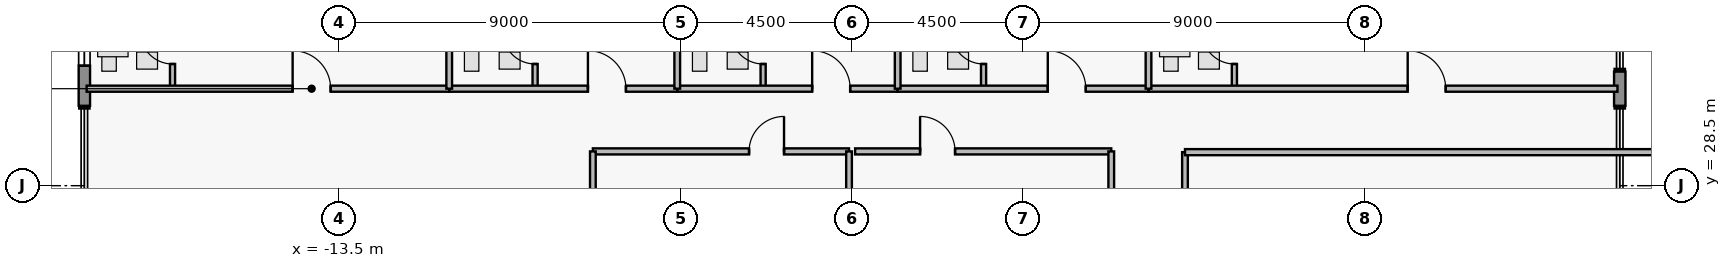
"""IFC4 building model, lengths in metres.
Left out: names, types, materials, properties, quantities, classifications, styles, units other than length and angle.
Written with IfcOpenShell. Run it as: python <this file> out.ifc"""

import sys

from ifc_helpers import new_model, si_unit, direction, frame, frame_2d, origin, place, context, subcontext, project, spatial, rectangle, extrude, element, fill, save


model = new_model("IFC4")
c1 = context("Model", 3, precision=1e-05, world=origin(), true_north=direction((0.0, 1.0)))
c2 = subcontext(c1, "Body", "Model", "MODEL_VIEW")
j1 = project(units=[si_unit("LENGTHUNIT", "METRE"), si_unit("PLANEANGLEUNIT", "RADIAN")], contexts=[c1])
p1 = place(None, origin())
s1 = spatial("IfcSite", under=j1, at=p1, CompositionType="ELEMENT")
p2 = place(p1, origin())
s2 = spatial("IfcBuilding", under=s1, at=p2, CompositionType="ELEMENT")
p3 = place(p2, frame((0.0, 0.0, 243.35)))
s3 = spatial("IfcBuildingStorey", under=s2, at=p3, CompositionType="ELEMENT", Elevation=243.35)
p4 = place(p3, frame((-20.2, 30.6, 0.0), z_axis=(0.0, 0.0, 1.0), x_axis=(0.0, 1.0, 0.0)))
e1 = element("IfcWall", 1, at=p4, inside=s3, PredefinedType="STANDARD", context=c2, shape_type="SweptSolid", body=[
    extrude(rectangle(XDim=5.0, YDim=0.3, at=frame_2d((2.5, 0.0))), origin(), (0.0, 0.0, 1.0), 3.48),
])
p5 = place(p4, frame((1.055, 0.0, 0.95)))
e2 = element("IfcOpeningElement", 2, at=p5, cuts=e1, PredefinedType="OPENING", context=c2, shape_type="SweptSolid", body=[
    extrude(rectangle(XDim=1.15, YDim=1.55, at=frame_2d((0.575, 0.775))), frame((0.0, 0.16, 0.0), z_axis=(0.0, -1.0, 0.0), x_axis=(1.0, 0.0, 0.0)), (0.0, 0.0, 1.0), 0.32),
])
p6 = place(p4, frame((3.27, 0.0, 0.95)))
e3 = element("IfcOpeningElement", 3, at=p6, cuts=e1, PredefinedType="OPENING", context=c2, shape_type="SweptSolid", body=[
    extrude(rectangle(XDim=1.15, YDim=1.55, at=frame_2d((0.575, 0.775))), frame((0.0, 0.16, 0.0), z_axis=(0.0, -1.0, 0.0), x_axis=(1.0, 0.0, 0.0)), (0.0, 0.0, 1.0), 0.32),
])
p7 = place(p3, frame((20.2, 31.5, 0.0), z_axis=(0.0, 0.0, 1.0), x_axis=(0.0, -1.0, 0.0)))
e4 = element("IfcWall", 4, at=p7, inside=s3, PredefinedType="STANDARD", context=c2, shape_type="SweptSolid", body=[
    extrude(rectangle(XDim=0.9, YDim=0.3, at=frame_2d((0.45, 0.0))), origin(), (0.0, 0.0, 1.0), 3.48),
])
p8 = place(p3, frame((-17.88, 31.05, 0.0), z_axis=(0.0, 0.0, 1.0), x_axis=(0.0, 1.0, 0.0)))
e5 = element("IfcWall", 5, at=p8, inside=s3, PredefinedType="PLUMBINGWALL", context=c2, shape_type="SweptSolid", body=[
    extrude(rectangle(XDim=2.36, YDim=0.135, at=frame_2d((1.18, 0.0))), origin(), (0.0, 0.0, 1.0), 3.48),
])
p9 = place(p8, frame((0.65, 0.0, 0.0)))
e6 = element("IfcOpeningElement", 6, at=p9, cuts=e5, PredefinedType="OPENING", context=c2, shape_type="SweptSolid", body=[
    extrude(rectangle(XDim=0.85, YDim=2.1, at=frame_2d((0.425, 1.05))), frame((0.0, 0.077, 0.0), z_axis=(0.0, -1.0, 0.0), x_axis=(1.0, 0.0, 0.0)), (0.0, 0.0, 1.0), 0.155),
])
p10 = place(p3, frame((-20.14, 31.05, 0.0), z_axis=(0.0, 0.0, 1.0), x_axis=(1.0, 0.0, 0.0)))
e7 = element("IfcWall", 7, at=p10, inside=s3, PredefinedType="PARTITIONING", context=c2, shape_type="SweptSolid", body=[
    extrude(rectangle(XDim=9.54, YDim=0.16, at=frame_2d((4.77, 0.0))), origin(), (0.0, 0.0, 1.0), 3.48),
])
p11 = place(p10, frame((5.42, 0.0, 0.0)))
e8 = element("IfcOpeningElement", 8, at=p11, cuts=e7, PredefinedType="OPENING", context=c2, shape_type="SweptSolid", body=[
    extrude(rectangle(XDim=1.0, YDim=2.15, at=frame_2d((0.5, 1.075))), frame((0.0, 0.09, 0.0), z_axis=(0.0, -1.0, 0.0), x_axis=(1.0, 0.0, 0.0)), (0.0, 0.0, 1.0), 0.18),
])
p12 = place(p3, frame((-8.34, 31.05, 0.0), z_axis=(0.0, 0.0, 1.0), x_axis=(0.0, 1.0, 0.0)))
e9 = element("IfcWall", 9, at=p12, inside=s3, PredefinedType="PLUMBINGWALL", context=c2, shape_type="SweptSolid", body=[
    extrude(rectangle(XDim=2.36, YDim=0.135, at=frame_2d((1.18, 0.0))), origin(), (0.0, 0.0, 1.0), 3.48),
])
p13 = place(p12, frame((0.65, 0.0, 0.0)))
e10 = element("IfcOpeningElement", 10, at=p13, cuts=e9, PredefinedType="OPENING", context=c2, shape_type="SweptSolid", body=[
    extrude(rectangle(XDim=0.85, YDim=2.1, at=frame_2d((0.425, 1.05))), frame((0.0, 0.077, 0.0), z_axis=(0.0, -1.0, 0.0), x_axis=(1.0, 0.0, 0.0)), (0.0, 0.0, 1.0), 0.155),
])
p14 = place(p3, frame((-10.6, 31.05, 0.0), z_axis=(0.0, 0.0, 1.0), x_axis=(1.0, 0.0, 0.0)))
e11 = element("IfcWall", 11, at=p14, inside=s3, PredefinedType="PARTITIONING", context=c2, shape_type="SweptSolid", body=[
    extrude(rectangle(XDim=6.0, YDim=0.16, at=frame_2d((3.0, 0.0))), origin(), (0.0, 0.0, 1.0), 3.48),
])
p15 = place(p14, frame((3.65, 0.0, 0.0)))
e12 = element("IfcOpeningElement", 12, at=p15, cuts=e11, PredefinedType="OPENING", context=c2, shape_type="SweptSolid", body=[
    extrude(rectangle(XDim=1.0, YDim=2.15, at=frame_2d((0.5, 1.075))), frame((0.0, 0.09, 0.0), z_axis=(0.0, -1.0, 0.0), x_axis=(1.0, 0.0, 0.0)), (0.0, 0.0, 1.0), 0.18),
])
p16 = place(p3, frame((-2.34, 31.05, 0.0), z_axis=(0.0, 0.0, 1.0), x_axis=(0.0, 1.0, 0.0)))
e13 = element("IfcWall", 13, at=p16, inside=s3, PredefinedType="PLUMBINGWALL", context=c2, shape_type="SweptSolid", body=[
    extrude(rectangle(XDim=2.36, YDim=0.135, at=frame_2d((1.18, 0.0))), origin(), (0.0, 0.0, 1.0), 3.48),
])
p17 = place(p16, frame((0.65, 0.0, 0.0)))
e14 = element("IfcOpeningElement", 14, at=p17, cuts=e13, PredefinedType="OPENING", context=c2, shape_type="SweptSolid", body=[
    extrude(rectangle(XDim=0.85, YDim=2.1, at=frame_2d((0.425, 1.05))), frame((0.0, 0.077, 0.0), z_axis=(0.0, -1.0, 0.0), x_axis=(1.0, 0.0, 0.0)), (0.0, 0.0, 1.0), 0.155),
])
p18 = place(p3, frame((-4.6, 31.05, 0.0), z_axis=(0.0, 0.0, 1.0), x_axis=(1.0, 0.0, 0.0)))
e15 = element("IfcWall", 15, at=p18, inside=s3, PredefinedType="PARTITIONING", context=c2, shape_type="SweptSolid", body=[
    extrude(rectangle(XDim=5.8, YDim=0.16, at=frame_2d((2.9, 0.0))), origin(), (0.0, 0.0, 1.0), 3.48),
])
p19 = place(p18, frame((3.55, 0.0, 0.0)))
e16 = element("IfcOpeningElement", 16, at=p19, cuts=e15, PredefinedType="OPENING", context=c2, shape_type="SweptSolid", body=[
    extrude(rectangle(XDim=1.0, YDim=2.15, at=frame_2d((0.5, 1.075))), frame((0.0, 0.09, 0.0), z_axis=(0.0, -1.0, 0.0), x_axis=(1.0, 0.0, 0.0)), (0.0, 0.0, 1.0), 0.18),
])
p20 = place(p3, frame((3.46, 31.05, 0.0), z_axis=(0.0, 0.0, 1.0), x_axis=(0.0, 1.0, 0.0)))
e17 = element("IfcWall", 17, at=p20, inside=s3, PredefinedType="PLUMBINGWALL", context=c2, shape_type="SweptSolid", body=[
    extrude(rectangle(XDim=2.36, YDim=0.135, at=frame_2d((1.18, 0.0))), origin(), (0.0, 0.0, 1.0), 3.48),
])
p21 = place(p20, frame((0.65, 0.0, 0.0)))
e18 = element("IfcOpeningElement", 18, at=p21, cuts=e17, PredefinedType="OPENING", context=c2, shape_type="SweptSolid", body=[
    extrude(rectangle(XDim=0.85, YDim=2.1, at=frame_2d((0.425, 1.05))), frame((0.0, 0.077, 0.0), z_axis=(0.0, -1.0, 0.0), x_axis=(1.0, 0.0, 0.0)), (0.0, 0.0, 1.0), 0.155),
])
p22 = place(p3, frame((1.2, 31.05, 0.0), z_axis=(0.0, 0.0, 1.0), x_axis=(1.0, 0.0, 0.0)))
e19 = element("IfcWall", 19, at=p22, inside=s3, PredefinedType="PARTITIONING", context=c2, shape_type="SweptSolid", body=[
    extrude(rectangle(XDim=6.6, YDim=0.16, at=frame_2d((3.3, 0.0))), origin(), (0.0, 0.0, 1.0), 3.48),
])
p23 = place(p22, frame((3.95, 0.0, 0.0)))
e20 = element("IfcOpeningElement", 20, at=p23, cuts=e19, PredefinedType="OPENING", context=c2, shape_type="SweptSolid", body=[
    extrude(rectangle(XDim=1.0, YDim=2.15, at=frame_2d((0.5, 1.075))), frame((0.0, 0.09, 0.0), z_axis=(0.0, -1.0, 0.0), x_axis=(1.0, 0.0, 0.0)), (0.0, 0.0, 1.0), 0.18),
])
p24 = place(p3, frame((10.06, 31.05, 0.0), z_axis=(0.0, 0.0, 1.0), x_axis=(0.0, 1.0, 0.0)))
e21 = element("IfcWall", 21, at=p24, inside=s3, PredefinedType="PLUMBINGWALL", context=c2, shape_type="SweptSolid", body=[
    extrude(rectangle(XDim=2.36, YDim=0.135, at=frame_2d((1.18, 0.0))), origin(), (0.0, 0.0, 1.0), 3.48),
])
p25 = place(p24, frame((0.65, 0.0, 0.0)))
e22 = element("IfcOpeningElement", 22, at=p25, cuts=e21, PredefinedType="OPENING", context=c2, shape_type="SweptSolid", body=[
    extrude(rectangle(XDim=0.85, YDim=2.1, at=frame_2d((0.425, 1.05))), frame((0.0, 0.077, 0.0), z_axis=(0.0, -1.0, 0.0), x_axis=(1.0, 0.0, 0.0)), (0.0, 0.0, 1.0), 0.155),
])
p26 = place(p3, frame((7.8, 31.05, 0.0), z_axis=(0.0, 0.0, 1.0), x_axis=(1.0, 0.0, 0.0)))
e23 = element("IfcWall", 23, at=p26, inside=s3, PredefinedType="PARTITIONING", context=c2, shape_type="SweptSolid", body=[
    extrude(rectangle(XDim=12.34, YDim=0.16, at=frame_2d((6.17, 0.0))), origin(), (0.0, 0.0, 1.0), 3.48),
])
p27 = place(p26, frame((6.82, 0.0, 0.0)))
e24 = element("IfcOpeningElement", 24, at=p27, cuts=e23, PredefinedType="OPENING", context=c2, shape_type="SweptSolid", body=[
    extrude(rectangle(XDim=1.0, YDim=2.15, at=frame_2d((0.5, 1.075))), frame((0.0, 0.09, 0.0), z_axis=(0.0, -1.0, 0.0), x_axis=(1.0, 0.0, 0.0)), (0.0, 0.0, 1.0), 0.18),
])
p28 = place(p3, frame((-6.82, 29.4, 0.0), z_axis=(0.0, 0.0, 1.0), x_axis=(1.0, 0.0, 0.0)))
e25 = element("IfcWall", 25, at=p28, inside=s3, PredefinedType="PARTITIONING", context=c2, shape_type="SweptSolid", body=[
    extrude(rectangle(XDim=6.74, YDim=0.16, at=frame_2d((3.37, 0.0))), origin(), (0.0, 0.0, 1.0), 3.48),
])
p29 = place(p28, frame((4.11, 0.0, 0.0)))
e26 = element("IfcOpeningElement", 26, at=p29, cuts=e25, PredefinedType="OPENING", context=c2, shape_type="SweptSolid", body=[
    extrude(rectangle(XDim=0.92, YDim=2.12, at=frame_2d((0.46, 1.06))), frame((0.0, 0.09, 0.0), z_axis=(0.0, -1.0, 0.0), x_axis=(1.0, 0.0, 0.0)), (0.0, 0.0, 1.0), 0.18),
])
p30 = place(p3, frame((0.08, 29.4, 0.0), z_axis=(0.0, 0.0, 1.0), x_axis=(1.0, 0.0, 0.0)))
e27 = element("IfcWall", 27, at=p30, inside=s3, PredefinedType="PARTITIONING", context=c2, shape_type="SweptSolid", body=[
    extrude(rectangle(XDim=6.74, YDim=0.16, at=frame_2d((3.37, 0.0))), origin(), (0.0, 0.0, 1.0), 3.48),
])
p31 = place(p30, frame((1.71, 0.0, 0.0)))
e28 = element("IfcOpeningElement", 28, at=p31, cuts=e27, PredefinedType="OPENING", context=c2, shape_type="SweptSolid", body=[
    extrude(rectangle(XDim=0.92, YDim=2.12, at=frame_2d((0.46, 1.06))), frame((0.0, 0.09, 0.0), z_axis=(0.0, -1.0, 0.0), x_axis=(1.0, 0.0, 0.0)), (0.0, 0.0, 1.0), 0.18),
])
p32 = place(p3, frame((-10.6, 31.05, 0.0), z_axis=(0.0, 0.0, 1.0), x_axis=(0.0, 1.0, 0.0)))
e29 = element("IfcWall", 29, at=p32, inside=s3, PredefinedType="PARTITIONING", context=c2, shape_type="SweptSolid", body=[
    extrude(rectangle(XDim=7.87, YDim=0.15, at=frame_2d((3.935, 0.0))), origin(), (0.0, 0.0, 1.0), 3.48),
])
p33 = place(p3, frame((-4.6, 31.05, 0.0), z_axis=(0.0, 0.0, 1.0), x_axis=(0.0, 1.0, 0.0)))
e30 = element("IfcWall", 30, at=p33, inside=s3, PredefinedType="PARTITIONING", context=c2, shape_type="SweptSolid", body=[
    extrude(rectangle(XDim=7.87, YDim=0.15, at=frame_2d((3.935, 0.0))), origin(), (0.0, 0.0, 1.0), 2.362),
])
for number, where, z_axis, x_axis in (
    (31, (1.2, 31.05, 0.0), (0.0, 0.0, 1.0), (0.0, 1.0, 0.0)),
    (32, (7.8, 31.05, 0.0), (0.0, 0.0, 1.0), (0.0, 1.0, 0.0)),
):
    element("IfcWall", number, at=place(p3, frame(where, z_axis=z_axis, x_axis=x_axis)), inside=s3, PredefinedType="PARTITIONING", context=c2, shape_type="SweptSolid", body=[
        extrude(rectangle(XDim=7.87, YDim=0.15, at=frame_2d((3.935, 0.0))), origin(), (0.0, 0.0, 1.0), 3.48),
    ])
for number, where, z_axis, x_axis in (
    (33, (-6.82, 27.0, 0.0), (0.0, 0.0, 1.0), (0.0, 1.0, 0.0)),
    (34, (-0.08, 27.0, 0.0), (0.0, 0.0, 1.0), (0.0, 1.0, 0.0)),
    (35, (6.82, 27.0, 0.0), (0.0, 0.0, 1.0), (0.0, 1.0, 0.0)),
):
    element("IfcWall", number, at=place(p3, frame(where, z_axis=z_axis, x_axis=x_axis)), inside=s3, PredefinedType="PARTITIONING", context=c2, shape_type="SweptSolid", body=[
        extrude(rectangle(XDim=2.4, YDim=0.15, at=frame_2d((1.2, 0.0))), origin(), (0.0, 0.0, 1.0), 3.48),
    ])
p34 = place(p3, frame((8.76, 16.7, 0.0), z_axis=(0.0, 0.0, 1.0), x_axis=(0.0, 1.0, 0.0)))
e36 = element("IfcWall", 36, at=p34, inside=s3, PredefinedType="PARTITIONING", context=c2, shape_type="SweptSolid", body=[
    extrude(rectangle(XDim=12.68, YDim=0.15, at=frame_2d((6.34, 0.0))), origin(), (0.0, 0.0, 1.0), 3.48),
])
p35 = place(p3, frame((8.76, 29.38, 0.0), z_axis=(0.0, 0.0, 1.0), x_axis=(1.0, 0.0, 0.0)))
e37 = element("IfcWall", 37, at=p35, inside=s3, PredefinedType="PARTITIONING", context=c2, shape_type="SweptSolid", body=[
    extrude(rectangle(XDim=13.88, YDim=0.16, at=frame_2d((6.94, 0.0))), origin(), (0.0, 0.0, 1.0), 3.48),
])
p36 = place(p5, origin())
e38 = element("IfcWindow", 38, at=p36, inside=s3, PartitioningType="SINGLE_PANEL", PredefinedType="WINDOW", context=c2, shape_type="SweptSolid", body=[
    extrude(rectangle(XDim=1.15, YDim=1.55, at=frame_2d((0.575, 0.775))), frame((0.0, 0.03, 0.0), z_axis=(0.0, -1.0, 0.0), x_axis=(1.0, 0.0, 0.0)), (0.0, 0.0, 1.0), 0.06),
])
fill(e2, e38)
p37 = place(p9, origin())
e39 = element("IfcDoor", 39, at=p37, inside=s3, OperationType="SINGLE_SWING_RIGHT", PredefinedType="DOOR", context=c2, shape_type="SweptSolid", body=[
    extrude(rectangle(XDim=0.85, YDim=2.1, at=frame_2d((0.425, 1.05))), frame((0.0, 0.025, 0.0), z_axis=(0.0, -1.0, 0.0), x_axis=(1.0, 0.0, 0.0)), (0.0, 0.0, 1.0), 0.05),
])
fill(e6, e39)
p38 = place(p11, origin())
e40 = element("IfcDoor", 40, at=p38, inside=s3, OperationType="SINGLE_SWING_LEFT", PredefinedType="DOOR", context=c2, shape_type="SweptSolid", body=[
    extrude(rectangle(XDim=1.0, YDim=2.15, at=frame_2d((0.5, 1.075))), frame((0.0, 0.025, 0.0), z_axis=(0.0, -1.0, 0.0), x_axis=(1.0, 0.0, 0.0)), (0.0, 0.0, 1.0), 0.05),
])
fill(e8, e40)
p39 = place(p13, origin())
e41 = element("IfcDoor", 41, at=p39, inside=s3, OperationType="SINGLE_SWING_RIGHT", PredefinedType="DOOR", context=c2, shape_type="SweptSolid", body=[
    extrude(rectangle(XDim=0.85, YDim=2.1, at=frame_2d((0.425, 1.05))), frame((0.0, 0.025, 0.0), z_axis=(0.0, -1.0, 0.0), x_axis=(1.0, 0.0, 0.0)), (0.0, 0.0, 1.0), 0.05),
])
fill(e10, e41)
p40 = place(p15, origin())
e42 = element("IfcDoor", 42, at=p40, inside=s3, OperationType="SINGLE_SWING_LEFT", PredefinedType="DOOR", context=c2, shape_type="SweptSolid", body=[
    extrude(rectangle(XDim=1.0, YDim=2.15, at=frame_2d((0.5, 1.075))), frame((0.0, 0.025, 0.0), z_axis=(0.0, -1.0, 0.0), x_axis=(1.0, 0.0, 0.0)), (0.0, 0.0, 1.0), 0.05),
])
fill(e12, e42)
p41 = place(p17, origin())
e43 = element("IfcDoor", 43, at=p41, inside=s3, OperationType="SINGLE_SWING_RIGHT", PredefinedType="DOOR", context=c2, shape_type="SweptSolid", body=[
    extrude(rectangle(XDim=0.85, YDim=2.1, at=frame_2d((0.425, 1.05))), frame((0.0, 0.025, 0.0), z_axis=(0.0, -1.0, 0.0), x_axis=(1.0, 0.0, 0.0)), (0.0, 0.0, 1.0), 0.05),
])
fill(e14, e43)
p42 = place(p19, origin())
e44 = element("IfcDoor", 44, at=p42, inside=s3, OperationType="SINGLE_SWING_LEFT", PredefinedType="DOOR", context=c2, shape_type="SweptSolid", body=[
    extrude(rectangle(XDim=1.0, YDim=2.15, at=frame_2d((0.5, 1.075))), frame((0.0, 0.025, 0.0), z_axis=(0.0, -1.0, 0.0), x_axis=(1.0, 0.0, 0.0)), (0.0, 0.0, 1.0), 0.05),
])
fill(e16, e44)
p43 = place(p21, origin())
e45 = element("IfcDoor", 45, at=p43, inside=s3, OperationType="SINGLE_SWING_RIGHT", PredefinedType="DOOR", context=c2, shape_type="SweptSolid", body=[
    extrude(rectangle(XDim=0.85, YDim=2.1, at=frame_2d((0.425, 1.05))), frame((0.0, 0.025, 0.0), z_axis=(0.0, -1.0, 0.0), x_axis=(1.0, 0.0, 0.0)), (0.0, 0.0, 1.0), 0.05),
])
fill(e18, e45)
p44 = place(p23, origin())
e46 = element("IfcDoor", 46, at=p44, inside=s3, OperationType="SINGLE_SWING_LEFT", PredefinedType="DOOR", context=c2, shape_type="SweptSolid", body=[
    extrude(rectangle(XDim=1.0, YDim=2.15, at=frame_2d((0.5, 1.075))), frame((0.0, 0.025, 0.0), z_axis=(0.0, -1.0, 0.0), x_axis=(1.0, 0.0, 0.0)), (0.0, 0.0, 1.0), 0.05),
])
fill(e20, e46)
p45 = place(p25, origin())
e47 = element("IfcDoor", 47, at=p45, inside=s3, OperationType="SINGLE_SWING_RIGHT", PredefinedType="DOOR", context=c2, shape_type="SweptSolid", body=[
    extrude(rectangle(XDim=0.85, YDim=2.1, at=frame_2d((0.425, 1.05))), frame((0.0, 0.025, 0.0), z_axis=(0.0, -1.0, 0.0), x_axis=(1.0, 0.0, 0.0)), (0.0, 0.0, 1.0), 0.05),
])
fill(e22, e47)
p46 = place(p27, origin())
e48 = element("IfcDoor", 48, at=p46, inside=s3, OperationType="SINGLE_SWING_LEFT", PredefinedType="DOOR", context=c2, shape_type="SweptSolid", body=[
    extrude(rectangle(XDim=1.0, YDim=2.15, at=frame_2d((0.5, 1.075))), frame((0.0, 0.025, 0.0), z_axis=(0.0, -1.0, 0.0), x_axis=(1.0, 0.0, 0.0)), (0.0, 0.0, 1.0), 0.05),
])
fill(e24, e48)
p47 = place(p29, origin())
e49 = element("IfcDoor", 49, at=p47, inside=s3, OperationType="SINGLE_SWING_RIGHT", PredefinedType="DOOR", context=c2, shape_type="SweptSolid", body=[
    extrude(rectangle(XDim=0.92, YDim=2.12, at=frame_2d((0.46, 1.06))), frame((0.0, 0.025, 0.0), z_axis=(0.0, -1.0, 0.0), x_axis=(1.0, 0.0, 0.0)), (0.0, 0.0, 1.0), 0.05),
])
fill(e26, e49)
p48 = place(p31, origin())
e50 = element("IfcDoor", 50, at=p48, inside=s3, OperationType="SINGLE_SWING_LEFT", PredefinedType="DOOR", context=c2, shape_type="SweptSolid", body=[
    extrude(rectangle(XDim=0.92, YDim=2.12, at=frame_2d((0.46, 1.06))), frame((0.0, 0.025, 0.0), z_axis=(0.0, -1.0, 0.0), x_axis=(1.0, 0.0, 0.0)), (0.0, 0.0, 1.0), 0.05),
])
fill(e28, e50)
save(model, sys.argv[1])
